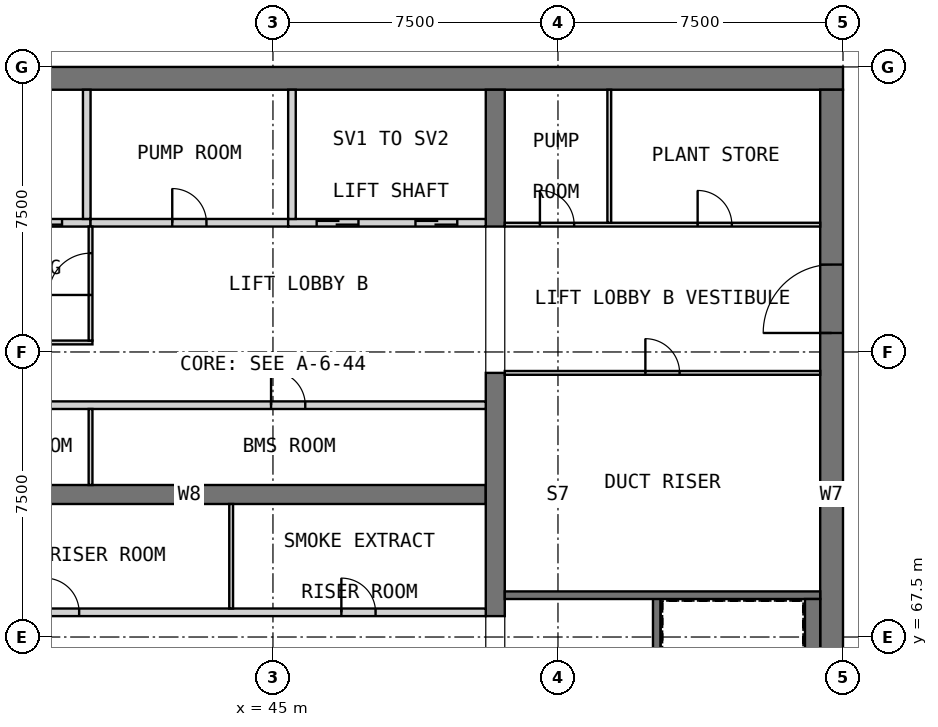
"""IFC4 building model, lengths in metres.
Left out: names, types, materials, properties, quantities, classifications, styles, units other than length and angle.
Written with IfcOpenShell. Run it as: python <this file> out.ifc"""

import sys

from ifc_helpers import new_model, si_unit, direction, frame, frame_2d, origin, place, context, subcontext, project, spatial, rectangle, extrude, element, fill, save


model = new_model("IFC4")
c1 = context("Model", 3, precision=1e-05, world=origin(), true_north=direction((0.0, 1.0)))
c2 = subcontext(c1, "Body", "Model", "MODEL_VIEW")
j1 = project(units=[si_unit("LENGTHUNIT", "METRE"), si_unit("PLANEANGLEUNIT", "RADIAN")], contexts=[c1])
p1 = place(None, origin())
s1 = spatial("IfcSite", under=j1, at=p1, CompositionType="ELEMENT")
p2 = place(p1, origin())
s2 = spatial("IfcBuilding", under=s1, at=p2, CompositionType="ELEMENT")
p3 = place(p2, frame((0.0, 0.0, 314.7)))
s3 = spatial("IfcBuildingStorey", under=s2, at=p3, CompositionType="ELEMENT", Elevation=314.7)
p4 = place(p3, frame((30.0, 82.2, 0.0), z_axis=(0.0, 0.0, 1.0), x_axis=(1.0, 0.0, 0.0)))
e1 = element("IfcWall", 1, at=p4, inside=s3, PredefinedType="SHEAR", context=c2, shape_type="SweptSolid", body=[
    extrude(rectangle(XDim=30.0, YDim=0.6, at=frame_2d((15.0, 0.0))), origin(), (0.0, 0.0, 1.0), 5.5),
])
p5 = place(p3, frame((59.7, 60.6, 0.0), z_axis=(0.0, 0.0, 1.0), x_axis=(0.0, 1.0, 0.0)))
e2 = element("IfcWall", 2, at=p5, inside=s3, PredefinedType="SHEAR", context=c2, shape_type="SweptSolid", body=[
    extrude(rectangle(XDim=21.3, YDim=0.6, at=frame_2d((10.65, 0.0))), origin(), (0.0, 0.0, 1.0), 5.5),
])
p6 = place(p5, frame((14.9, 0.0, 0.0)))
e3 = element("IfcOpeningElement", 3, at=p6, cuts=e2, PredefinedType="OPENING", context=c2, shape_type="SweptSolid", body=[
    extrude(rectangle(XDim=1.8, YDim=2.1, at=frame_2d((0.9, 1.05))), frame((0.0, 0.31, 0.0), z_axis=(0.0, -1.0, 0.0), x_axis=(1.0, 0.0, 0.0)), (0.0, 0.0, 1.0), 0.62),
])
p7 = place(p3, frame((35.0, 71.25, 0.0), z_axis=(0.0, 0.0, 1.0), x_axis=(1.0, 0.0, 0.0)))
e4 = element("IfcWall", 4, at=p7, inside=s3, PredefinedType="SHEAR", context=c2, shape_type="SweptSolid", body=[
    extrude(rectangle(XDim=15.6, YDim=0.5, at=frame_2d((7.8, 0.0))), origin(), (0.0, 0.0, 1.0), 5.5),
])
p8 = place(p3, frame((50.85, 68.05, 0.0), z_axis=(0.0, 0.0, 1.0), x_axis=(0.0, 1.0, 0.0)))
e5 = element("IfcWall", 5, at=p8, inside=s3, PredefinedType="SHEAR", context=c2, shape_type="SweptSolid", body=[
    extrude(rectangle(XDim=6.4, YDim=0.5, at=frame_2d((3.2, 0.0))), origin(), (0.0, 0.0, 1.0), 5.5),
])
p9 = place(p3, frame((50.85, 78.3, 0.0), z_axis=(0.0, 0.0, 1.0), x_axis=(0.0, 1.0, 0.0)))
e6 = element("IfcWall", 6, at=p9, inside=s3, PredefinedType="SHEAR", context=c2, shape_type="SweptSolid", body=[
    extrude(rectangle(XDim=3.6, YDim=0.5, at=frame_2d((1.8, 0.0))), origin(), (0.0, 0.0, 1.0), 5.5),
])
p10 = place(p3, frame((35.0, 68.15, 0.0), z_axis=(0.0, 0.0, 1.0), x_axis=(1.0, 0.0, 0.0)))
e7 = element("IfcWall", 7, at=p10, inside=s3, PredefinedType="PARTITIONING", context=c2, shape_type="SweptSolid", body=[
    extrude(rectangle(XDim=15.6, YDim=0.2, at=frame_2d((7.8, 0.0))), origin(), (0.0, 0.0, 1.0), 5.09),
])
p11 = place(p10, frame((4.0, 0.0, 0.0)))
e8 = element("IfcOpeningElement", 8, at=p11, cuts=e7, PredefinedType="OPENING", context=c2, shape_type="SweptSolid", body=[
    extrude(rectangle(XDim=0.9, YDim=2.1, at=frame_2d((0.45, 1.05))), frame((0.0, 0.11, 0.0), z_axis=(0.0, -1.0, 0.0), x_axis=(1.0, 0.0, 0.0)), (0.0, 0.0, 1.0), 0.22),
])
p12 = place(p10, frame((11.8, 0.0, 0.0)))
e9 = element("IfcOpeningElement", 9, at=p12, cuts=e7, PredefinedType="OPENING", context=c2, shape_type="SweptSolid", body=[
    extrude(rectangle(XDim=0.9, YDim=2.1, at=frame_2d((0.45, 1.05))), frame((0.0, 0.11, 0.0), z_axis=(0.0, -1.0, 0.0), x_axis=(1.0, 0.0, 0.0)), (0.0, 0.0, 1.0), 0.22),
])
p13 = place(p3, frame((43.9, 68.25, 0.0), z_axis=(0.0, 0.0, 1.0), x_axis=(0.0, 1.0, 0.0)))
e10 = element("IfcWall", 10, at=p13, inside=s3, PredefinedType="PARTITIONING", context=c2, shape_type="SweptSolid", body=[
    extrude(rectangle(XDim=2.75, YDim=0.1, at=frame_2d((1.375, 0.0))), origin(), (0.0, 0.0, 1.0), 5.09),
])
p14 = place(p3, frame((35.0, 73.6, 0.0), z_axis=(0.0, 0.0, 1.0), x_axis=(1.0, 0.0, 0.0)))
e11 = element("IfcWall", 11, at=p14, inside=s3, PredefinedType="PARTITIONING", context=c2, shape_type="SweptSolid", body=[
    extrude(rectangle(XDim=15.6, YDim=0.2, at=frame_2d((7.8, 0.0))), origin(), (0.0, 0.0, 1.0), 5.09),
])
p15 = place(p14, frame((2.15, 0.0, 0.0)))
e12 = element("IfcOpeningElement", 12, at=p15, cuts=e11, PredefinedType="OPENING", context=c2, shape_type="SweptSolid", body=[
    extrude(rectangle(XDim=0.9, YDim=2.1, at=frame_2d((0.45, 1.05))), frame((0.0, 0.11, 0.0), z_axis=(0.0, -1.0, 0.0), x_axis=(1.0, 0.0, 0.0)), (0.0, 0.0, 1.0), 0.22),
])
p16 = place(p14, frame((9.95, 0.0, 0.0)))
e13 = element("IfcOpeningElement", 13, at=p16, cuts=e11, PredefinedType="OPENING", context=c2, shape_type="SweptSolid", body=[
    extrude(rectangle(XDim=0.9, YDim=2.1, at=frame_2d((0.45, 1.05))), frame((0.0, 0.11, 0.0), z_axis=(0.0, -1.0, 0.0), x_axis=(1.0, 0.0, 0.0)), (0.0, 0.0, 1.0), 0.22),
])
p17 = place(p3, frame((40.2, 71.5, 0.0), z_axis=(0.0, 0.0, 1.0), x_axis=(0.0, 1.0, 0.0)))
e14 = element("IfcWall", 14, at=p17, inside=s3, PredefinedType="PARTITIONING", context=c2, shape_type="SweptSolid", body=[
    extrude(rectangle(XDim=2.0, YDim=0.1, at=frame_2d((1.0, 0.0))), origin(), (0.0, 0.0, 1.0), 5.09),
])
p18 = place(p3, frame((35.0, 78.4, 0.0), z_axis=(0.0, 0.0, 1.0), x_axis=(1.0, 0.0, 0.0)))
e15 = element("IfcWall", 15, at=p18, inside=s3, PredefinedType="SOLIDWALL", context=c2, shape_type="SweptSolid", body=[
    extrude(rectangle(XDim=5.2, YDim=0.2, at=frame_2d((2.6, 0.0))), origin(), (0.0, 0.0, 1.0), 5.5),
])
p19 = place(p18, frame((0.75, 0.0, 0.0)))
e16 = element("IfcOpeningElement", 16, at=p19, cuts=e15, PredefinedType="OPENING", context=c2, shape_type="SweptSolid", body=[
    extrude(rectangle(XDim=1.1, YDim=2.1, at=frame_2d((0.55, 1.05))), frame((0.0, 0.11, 0.0), z_axis=(0.0, -1.0, 0.0), x_axis=(1.0, 0.0, 0.0)), (0.0, 0.0, 1.0), 0.22),
])
p20 = place(p18, frame((3.35, 0.0, 0.0)))
e17 = element("IfcOpeningElement", 17, at=p20, cuts=e15, PredefinedType="OPENING", context=c2, shape_type="SweptSolid", body=[
    extrude(rectangle(XDim=1.1, YDim=2.1, at=frame_2d((0.55, 1.05))), frame((0.0, 0.11, 0.0), z_axis=(0.0, -1.0, 0.0), x_axis=(1.0, 0.0, 0.0)), (0.0, 0.0, 1.0), 0.22),
])
p21 = place(p3, frame((40.1, 78.5, 0.0), z_axis=(0.0, 0.0, 1.0), x_axis=(0.0, 1.0, 0.0)))
e18 = element("IfcWall", 18, at=p21, inside=s3, PredefinedType="SOLIDWALL", context=c2, shape_type="SweptSolid", body=[
    extrude(rectangle(XDim=3.4, YDim=0.2, at=frame_2d((1.7, 0.0))), origin(), (0.0, 0.0, 1.0), 5.5),
])
p22 = place(p3, frame((40.2, 78.4, 0.0), z_axis=(0.0, 0.0, 1.0), x_axis=(1.0, 0.0, 0.0)))
e19 = element("IfcWall", 19, at=p22, inside=s3, PredefinedType="PARTITIONING", context=c2, shape_type="SweptSolid", body=[
    extrude(rectangle(XDim=5.2, YDim=0.2, at=frame_2d((2.6, 0.0))), origin(), (0.0, 0.0, 1.0), 5.09),
])
p23 = place(p22, frame((2.15, 0.0, 0.0)))
e20 = element("IfcOpeningElement", 20, at=p23, cuts=e19, PredefinedType="OPENING", context=c2, shape_type="SweptSolid", body=[
    extrude(rectangle(XDim=0.9, YDim=2.1, at=frame_2d((0.45, 1.05))), frame((0.0, 0.11, 0.0), z_axis=(0.0, -1.0, 0.0), x_axis=(1.0, 0.0, 0.0)), (0.0, 0.0, 1.0), 0.22),
])
p24 = place(p3, frame((45.4, 78.4, 0.0), z_axis=(0.0, 0.0, 1.0), x_axis=(1.0, 0.0, 0.0)))
e21 = element("IfcWall", 21, at=p24, inside=s3, PredefinedType="SOLIDWALL", context=c2, shape_type="SweptSolid", body=[
    extrude(rectangle(XDim=5.2, YDim=0.2, at=frame_2d((2.6, 0.0))), origin(), (0.0, 0.0, 1.0), 5.5),
])
p25 = place(p24, frame((0.75, 0.0, 0.0)))
e22 = element("IfcOpeningElement", 22, at=p25, cuts=e21, PredefinedType="OPENING", context=c2, shape_type="SweptSolid", body=[
    extrude(rectangle(XDim=1.1, YDim=2.1, at=frame_2d((0.55, 1.05))), frame((0.0, 0.11, 0.0), z_axis=(0.0, -1.0, 0.0), x_axis=(1.0, 0.0, 0.0)), (0.0, 0.0, 1.0), 0.22),
])
p26 = place(p24, frame((3.35, 0.0, 0.0)))
e23 = element("IfcOpeningElement", 23, at=p26, cuts=e21, PredefinedType="OPENING", context=c2, shape_type="SweptSolid", body=[
    extrude(rectangle(XDim=1.1, YDim=2.1, at=frame_2d((0.55, 1.05))), frame((0.0, 0.11, 0.0), z_axis=(0.0, -1.0, 0.0), x_axis=(1.0, 0.0, 0.0)), (0.0, 0.0, 1.0), 0.22),
])
p27 = place(p3, frame((45.5, 78.5, 0.0), z_axis=(0.0, 0.0, 1.0), x_axis=(0.0, 1.0, 0.0)))
e24 = element("IfcWall", 24, at=p27, inside=s3, PredefinedType="SOLIDWALL", context=c2, shape_type="SweptSolid", body=[
    extrude(rectangle(XDim=3.4, YDim=0.2, at=frame_2d((1.7, 0.0))), origin(), (0.0, 0.0, 1.0), 5.5),
])
p28 = place(p3, frame((35.0, 75.25, 0.0), z_axis=(0.0, 0.0, 1.0), x_axis=(1.0, 0.0, 0.0)))
e25 = element("IfcWall", 25, at=p28, inside=s3, PredefinedType="PARTITIONING", context=c2, shape_type="SweptSolid", body=[
    extrude(rectangle(XDim=5.25, YDim=0.1, at=frame_2d((2.625, 0.0))), origin(), (0.0, 0.0, 1.0), 5.09),
])
p29 = place(p3, frame((40.2, 75.3, 0.0), z_axis=(0.0, 0.0, 1.0), x_axis=(0.0, 1.0, 0.0)))
e26 = element("IfcWall", 26, at=p29, inside=s3, PredefinedType="PARTITIONING", context=c2, shape_type="SweptSolid", body=[
    extrude(rectangle(XDim=3.0, YDim=0.1, at=frame_2d((1.5, 0.0))), origin(), (0.0, 0.0, 1.0), 5.09),
])
p30 = place(p29, frame((1.2, 0.0, 0.0)))
e27 = element("IfcOpeningElement", 27, at=p30, cuts=e26, PredefinedType="OPENING", context=c2, shape_type="SweptSolid", body=[
    extrude(rectangle(XDim=1.1, YDim=2.1, at=frame_2d((0.55, 1.05))), frame((0.0, 0.06, 0.0), z_axis=(0.0, -1.0, 0.0), x_axis=(1.0, 0.0, 0.0)), (0.0, 0.0, 1.0), 0.12),
])
p31 = place(p3, frame((55.1, 60.6, 0.0), z_axis=(0.0, 0.0, 1.0), x_axis=(0.0, 1.0, 0.0)))
e28 = element("IfcWall", 28, at=p31, inside=s3, PredefinedType="SOLIDWALL", context=c2, shape_type="SweptSolid", body=[
    extrude(rectangle(XDim=8.0, YDim=0.2, at=frame_2d((4.0, 0.0))), origin(), (0.0, 0.0, 1.0), 5.09),
])
p32 = place(p3, frame((51.1, 68.6, 0.0), z_axis=(0.0, 0.0, 1.0), x_axis=(1.0, 0.0, 0.0)))
e29 = element("IfcWall", 29, at=p32, inside=s3, PredefinedType="SOLIDWALL", context=c2, shape_type="SweptSolid", body=[
    extrude(rectangle(XDim=8.3, YDim=0.2, at=frame_2d((4.15, 0.0))), origin(), (0.0, 0.0, 1.0), 5.09),
])
p33 = place(p3, frame((59.2, 60.6, 0.0), z_axis=(0.0, 0.0, 1.0), x_axis=(0.0, 1.0, 0.0)))
e30 = element("IfcWall", 30, at=p33, inside=s3, PredefinedType="SOLIDWALL", context=c2, shape_type="SweptSolid", body=[
    extrude(rectangle(XDim=7.9, YDim=0.4, at=frame_2d((3.95, 0.0))), origin(), (0.0, 0.0, 1.0), 5.09),
])
p34 = place(p3, frame((51.1, 74.45, 0.0), z_axis=(0.0, 0.0, 1.0), x_axis=(1.0, 0.0, 0.0)))
e31 = element("IfcWall", 31, at=p34, inside=s3, PredefinedType="PARTITIONING", context=c2, shape_type="SweptSolid", body=[
    extrude(rectangle(XDim=8.3, YDim=0.1, at=frame_2d((4.15, 0.0))), origin(), (0.0, 0.0, 1.0), 5.09),
])
p35 = place(p34, frame((3.7, 0.0, 0.0)))
e32 = element("IfcOpeningElement", 32, at=p35, cuts=e31, PredefinedType="OPENING", context=c2, shape_type="SweptSolid", body=[
    extrude(rectangle(XDim=0.9, YDim=2.1, at=frame_2d((0.45, 1.05))), frame((0.0, 0.06, 0.0), z_axis=(0.0, -1.0, 0.0), x_axis=(1.0, 0.0, 0.0)), (0.0, 0.0, 1.0), 0.12),
])
p36 = place(p3, frame((51.1, 78.35, 0.0), z_axis=(0.0, 0.0, 1.0), x_axis=(1.0, 0.0, 0.0)))
e33 = element("IfcWall", 33, at=p36, inside=s3, PredefinedType="PARTITIONING", context=c2, shape_type="SweptSolid", body=[
    extrude(rectangle(XDim=8.3, YDim=0.1, at=frame_2d((4.15, 0.0))), origin(), (0.0, 0.0, 1.0), 5.09),
])
p37 = place(p36, frame((0.925, 0.0, 0.0)))
e34 = element("IfcOpeningElement", 34, at=p37, cuts=e33, PredefinedType="OPENING", context=c2, shape_type="SweptSolid", body=[
    extrude(rectangle(XDim=0.9, YDim=2.1, at=frame_2d((0.45, 1.05))), frame((0.0, 0.06, 0.0), z_axis=(0.0, -1.0, 0.0), x_axis=(1.0, 0.0, 0.0)), (0.0, 0.0, 1.0), 0.12),
])
p38 = place(p36, frame((5.075, 0.0, 0.0)))
e35 = element("IfcOpeningElement", 35, at=p38, cuts=e33, PredefinedType="OPENING", context=c2, shape_type="SweptSolid", body=[
    extrude(rectangle(XDim=0.9, YDim=2.1, at=frame_2d((0.45, 1.05))), frame((0.0, 0.06, 0.0), z_axis=(0.0, -1.0, 0.0), x_axis=(1.0, 0.0, 0.0)), (0.0, 0.0, 1.0), 0.12),
])
p39 = place(p3, frame((53.85, 78.4, 0.0), z_axis=(0.0, 0.0, 1.0), x_axis=(0.0, 1.0, 0.0)))
e36 = element("IfcWall", 36, at=p39, inside=s3, PredefinedType="PARTITIONING", context=c2, shape_type="SweptSolid", body=[
    extrude(rectangle(XDim=3.5, YDim=0.1, at=frame_2d((1.75, 0.0))), origin(), (0.0, 0.0, 1.0), 5.09),
])
p40 = place(p11, origin())
e37 = element("IfcDoor", 37, at=p40, inside=s3, OperationType="SINGLE_SWING_LEFT", PredefinedType="DOOR", context=c2, shape_type="SweptSolid", body=[
    extrude(rectangle(XDim=0.9, YDim=2.1, at=frame_2d((0.45, 1.05))), frame((0.0, 0.025, 0.0), z_axis=(0.0, -1.0, 0.0), x_axis=(1.0, 0.0, 0.0)), (0.0, 0.0, 1.0), 0.05),
])
fill(e8, e37)
p41 = place(p12, origin())
e38 = element("IfcDoor", 38, at=p41, inside=s3, OperationType="SINGLE_SWING_RIGHT", PredefinedType="DOOR", context=c2, shape_type="SweptSolid", body=[
    extrude(rectangle(XDim=0.9, YDim=2.1, at=frame_2d((0.45, 1.05))), frame((0.0, 0.025, 0.0), z_axis=(0.0, -1.0, 0.0), x_axis=(1.0, 0.0, 0.0)), (0.0, 0.0, 1.0), 0.05),
])
fill(e9, e38)
p42 = place(p16, origin())
e39 = element("IfcDoor", 39, at=p42, inside=s3, OperationType="SINGLE_SWING_RIGHT", PredefinedType="DOOR", context=c2, shape_type="SweptSolid", body=[
    extrude(rectangle(XDim=0.9, YDim=2.1, at=frame_2d((0.45, 1.05))), frame((0.0, 0.025, 0.0), z_axis=(0.0, -1.0, 0.0), x_axis=(1.0, 0.0, 0.0)), (0.0, 0.0, 1.0), 0.05),
])
fill(e13, e39)
p43 = place(p20, origin())
e40 = element("IfcDoor", 40, at=p43, inside=s3, OperationType="DOUBLE_DOOR_SLIDING", PredefinedType="DOOR", context=c2, shape_type="SweptSolid", body=[
    extrude(rectangle(XDim=1.1, YDim=2.1, at=frame_2d((0.55, 1.05))), frame((0.0, 0.025, 0.0), z_axis=(0.0, -1.0, 0.0), x_axis=(1.0, 0.0, 0.0)), (0.0, 0.0, 1.0), 0.05),
])
fill(e17, e40)
p44 = place(p23, origin())
e41 = element("IfcDoor", 41, at=p44, inside=s3, OperationType="SINGLE_SWING_LEFT", PredefinedType="DOOR", context=c2, shape_type="SweptSolid", body=[
    extrude(rectangle(XDim=0.9, YDim=2.1, at=frame_2d((0.45, 1.05))), frame((0.0, 0.025, 0.0), z_axis=(0.0, -1.0, 0.0), x_axis=(1.0, 0.0, 0.0)), (0.0, 0.0, 1.0), 0.05),
])
fill(e20, e41)
p45 = place(p25, origin())
e42 = element("IfcDoor", 42, at=p45, inside=s3, OperationType="DOUBLE_DOOR_SLIDING", PredefinedType="DOOR", context=c2, shape_type="SweptSolid", body=[
    extrude(rectangle(XDim=1.1, YDim=2.1, at=frame_2d((0.55, 1.05))), frame((0.0, 0.025, 0.0), z_axis=(0.0, -1.0, 0.0), x_axis=(1.0, 0.0, 0.0)), (0.0, 0.0, 1.0), 0.05),
])
fill(e22, e42)
p46 = place(p26, origin())
e43 = element("IfcDoor", 43, at=p46, inside=s3, OperationType="DOUBLE_DOOR_SLIDING", PredefinedType="DOOR", context=c2, shape_type="SweptSolid", body=[
    extrude(rectangle(XDim=1.1, YDim=2.1, at=frame_2d((0.55, 1.05))), frame((0.0, 0.025, 0.0), z_axis=(0.0, -1.0, 0.0), x_axis=(1.0, 0.0, 0.0)), (0.0, 0.0, 1.0), 0.05),
])
fill(e23, e43)
p47 = place(p6, origin())
e44 = element("IfcDoor", 44, at=p47, inside=s3, OperationType="DOUBLE_DOOR_SINGLE_SWING", PredefinedType="DOOR", context=c2, shape_type="SweptSolid", body=[
    extrude(rectangle(XDim=1.8, YDim=2.1, at=frame_2d((0.9, 1.05))), frame((0.0, 0.025, 0.0), z_axis=(0.0, -1.0, 0.0), x_axis=(1.0, 0.0, 0.0)), (0.0, 0.0, 1.0), 0.05),
])
fill(e3, e44)
p48 = place(p30, origin())
e45 = element("IfcDoor", 45, at=p48, inside=s3, OperationType="SINGLE_SWING_LEFT", PredefinedType="DOOR", context=c2, shape_type="SweptSolid", body=[
    extrude(rectangle(XDim=1.1, YDim=2.1, at=frame_2d((0.55, 1.05))), frame((0.0, 0.025, 0.0), z_axis=(0.0, -1.0, 0.0), x_axis=(1.0, 0.0, 0.0)), (0.0, 0.0, 1.0), 0.05),
])
fill(e27, e45)
p49 = place(p35, origin())
e46 = element("IfcDoor", 46, at=p49, inside=s3, OperationType="SINGLE_SWING_LEFT", PredefinedType="DOOR", context=c2, shape_type="SweptSolid", body=[
    extrude(rectangle(XDim=0.9, YDim=2.1, at=frame_2d((0.45, 1.05))), frame((0.0, 0.025, 0.0), z_axis=(0.0, -1.0, 0.0), x_axis=(1.0, 0.0, 0.0)), (0.0, 0.0, 1.0), 0.05),
])
fill(e32, e46)
p50 = place(p37, origin())
e47 = element("IfcDoor", 47, at=p50, inside=s3, OperationType="SINGLE_SWING_LEFT", PredefinedType="DOOR", context=c2, shape_type="SweptSolid", body=[
    extrude(rectangle(XDim=0.9, YDim=2.1, at=frame_2d((0.45, 1.05))), frame((0.0, 0.025, 0.0), z_axis=(0.0, -1.0, 0.0), x_axis=(1.0, 0.0, 0.0)), (0.0, 0.0, 1.0), 0.05),
])
fill(e34, e47)
p51 = place(p38, origin())
e48 = element("IfcDoor", 48, at=p51, inside=s3, OperationType="SINGLE_SWING_RIGHT", PredefinedType="DOOR", context=c2, shape_type="SweptSolid", body=[
    extrude(rectangle(XDim=0.9, YDim=2.1, at=frame_2d((0.45, 1.05))), frame((0.0, 0.025, 0.0), z_axis=(0.0, -1.0, 0.0), x_axis=(1.0, 0.0, 0.0)), (0.0, 0.0, 1.0), 0.05),
])
fill(e35, e48)
save(model, sys.argv[1])
